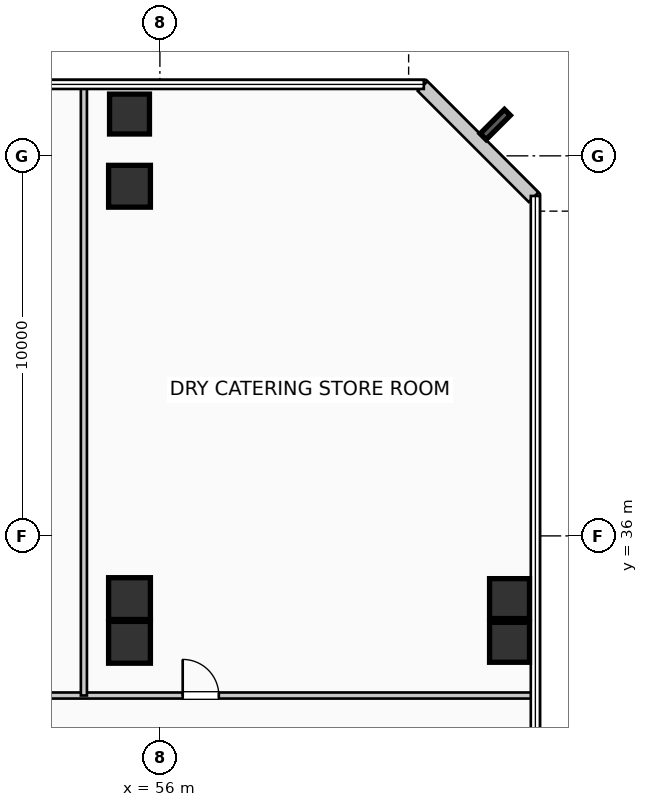
"""IFC4 building model, lengths in metres.
Left out: names, types, materials, properties, quantities, classifications, styles, units other than length and angle.
Written with IfcOpenShell. Run it as: python <this file> out.ifc"""

import sys

from ifc_helpers import new_model, si_unit, direction, frame, frame_2d, origin, origin_2d, place, context, subcontext, project, spatial, rectangle, extrude, element, fill, save


model = new_model("IFC4")
c1 = context("Model", 3, precision=1e-05, world=origin(), true_north=direction((0.0, 1.0)))
c2 = subcontext(c1, "Body", "Model", "MODEL_VIEW")
j1 = project(units=[si_unit("LENGTHUNIT", "METRE"), si_unit("PLANEANGLEUNIT", "RADIAN")], contexts=[c1])
p1 = place(None, origin())
s1 = spatial("IfcSite", under=j1, at=p1, CompositionType="ELEMENT")
p2 = place(p1, origin())
s2 = spatial("IfcBuilding", under=s1, at=p2, CompositionType="ELEMENT")
p3 = place(p2, frame((0.0, 0.0, 21.12)))
s3 = spatial("IfcBuildingStorey", under=s2, at=p3, CompositionType="ELEMENT", Elevation=21.12)
for number, where, z_axis, x_axis in (
    (1, (55.2, 33.2, 0.0), (0.0, 0.0, 1.0), (1.0, 0.0, 0.0)),
    (2, (55.2, 34.35, 0.0), (0.0, 0.0, 1.0), (1.0, 0.0, 0.0)),
    (3, (55.2, 45.2, 0.0), (0.0, 0.0, 1.0), (1.0, 0.0, 0.0)),
):
    element("IfcColumn", number, at=place(p3, frame(where, z_axis=z_axis, x_axis=x_axis)), inside=s3, PredefinedType="COLUMN", context=c2, shape_type="SweptSolid", body=[
        extrude(rectangle(XDim=1.1, YDim=1.1, at=origin_2d()), origin(), (0.0, 0.0, 1.0), 4.62),
    ])
for number, where, z_axis, x_axis in (
    (4, (55.2, 47.1, 0.0), (0.0, 0.0, 1.0), (1.0, 0.0, 0.0)),
    (5, (65.2, 33.2, 0.0), (0.0, 0.0, 1.0), (1.0, 0.0, 0.0)),
    (6, (65.2, 34.35, 0.0), (0.0, 0.0, 1.0), (1.0, 0.0, 0.0)),
):
    element("IfcColumn", number, at=place(p3, frame(where, z_axis=z_axis, x_axis=x_axis)), inside=s3, PredefinedType="COLUMN", context=c2, shape_type="SweptSolid", body=[
        extrude(rectangle(XDim=1.05, YDim=1.05, at=origin_2d()), origin(), (0.0, 0.0, 1.0), 4.62),
    ])
p4 = place(p3, frame((65.834, 44.912, 0.0), z_axis=(0.0, 0.0, 1.0), x_axis=(-0.707106781187, 0.707106781187, 0.0)))
e7 = element("IfcWall", 7, at=p4, inside=s3, PredefinedType="SOLIDWALL", context=c2, shape_type="SweptSolid", body=[
    extrude(rectangle(XDim=4.133, YDim=0.36, at=frame_2d((2.066, 0.0))), origin(), (0.0, 0.0, 1.0), 4.2),
])
p5 = place(p3, frame((23.6, 31.8, 0.0), z_axis=(0.0, 0.0, 1.0), x_axis=(1.0, 0.0, 0.0)))
e8 = element("IfcWall", 8, at=p5, inside=s3, PredefinedType="PARTITIONING", context=c2, shape_type="SweptSolid", body=[
    extrude(rectangle(XDim=42.21, YDim=0.16, at=frame_2d((21.105, 0.0))), origin(), (0.0, 0.0, 1.0), 4.2),
])
p6 = place(p5, frame((5.0, 0.0, 0.0)))
e9 = element("IfcOpeningElement", 9, at=p6, cuts=e8, PredefinedType="OPENING", context=c2, shape_type="SweptSolid", body=[
    extrude(rectangle(XDim=1.8, YDim=2.3, at=frame_2d((0.9, 1.15))), frame((0.0, 0.09, 0.0), z_axis=(0.0, -1.0, 0.0), x_axis=(1.0, 0.0, 0.0)), (0.0, 0.0, 1.0), 0.18),
])
p7 = place(p5, frame((22.0, 0.0, 0.0)))
e10 = element("IfcOpeningElement", 10, at=p7, cuts=e8, PredefinedType="OPENING", context=c2, shape_type="SweptSolid", body=[
    extrude(rectangle(XDim=0.95, YDim=2.1, at=frame_2d((0.475, 1.05))), frame((0.0, 0.09, 0.0), z_axis=(0.0, -1.0, 0.0), x_axis=(1.0, 0.0, 0.0)), (0.0, 0.0, 1.0), 0.18),
])
p8 = place(p5, frame((33.0, 0.0, 0.0)))
e11 = element("IfcOpeningElement", 11, at=p8, cuts=e8, PredefinedType="OPENING", context=c2, shape_type="SweptSolid", body=[
    extrude(rectangle(XDim=0.95, YDim=2.1, at=frame_2d((0.475, 1.05))), frame((0.0, 0.09, 0.0), z_axis=(0.0, -1.0, 0.0), x_axis=(1.0, 0.0, 0.0)), (0.0, 0.0, 1.0), 0.18),
])
p9 = place(p3, frame((54.0, 31.8, 0.0), z_axis=(0.0, 0.0, 1.0), x_axis=(0.0, 1.0, 0.0)))
e12 = element("IfcWall", 12, at=p9, inside=s3, PredefinedType="PARTITIONING", context=c2, shape_type="SweptSolid", body=[
    extrude(rectangle(XDim=16.01, YDim=0.16, at=frame_2d((8.005, 0.0))), origin(), (0.0, 0.0, 1.0), 4.2),
])
p10 = place(p8, origin())
e13 = element("IfcDoor", 13, at=p10, inside=s3, OperationType="SINGLE_SWING_LEFT", PredefinedType="DOOR", context=c2, shape_type="SweptSolid", body=[
    extrude(rectangle(XDim=0.95, YDim=2.1, at=frame_2d((0.475, 1.05))), frame((0.0, 0.025, 0.0), z_axis=(0.0, -1.0, 0.0), x_axis=(1.0, 0.0, 0.0)), (0.0, 0.0, 1.0), 0.05),
])
fill(e11, e13)
save(model, sys.argv[1])
